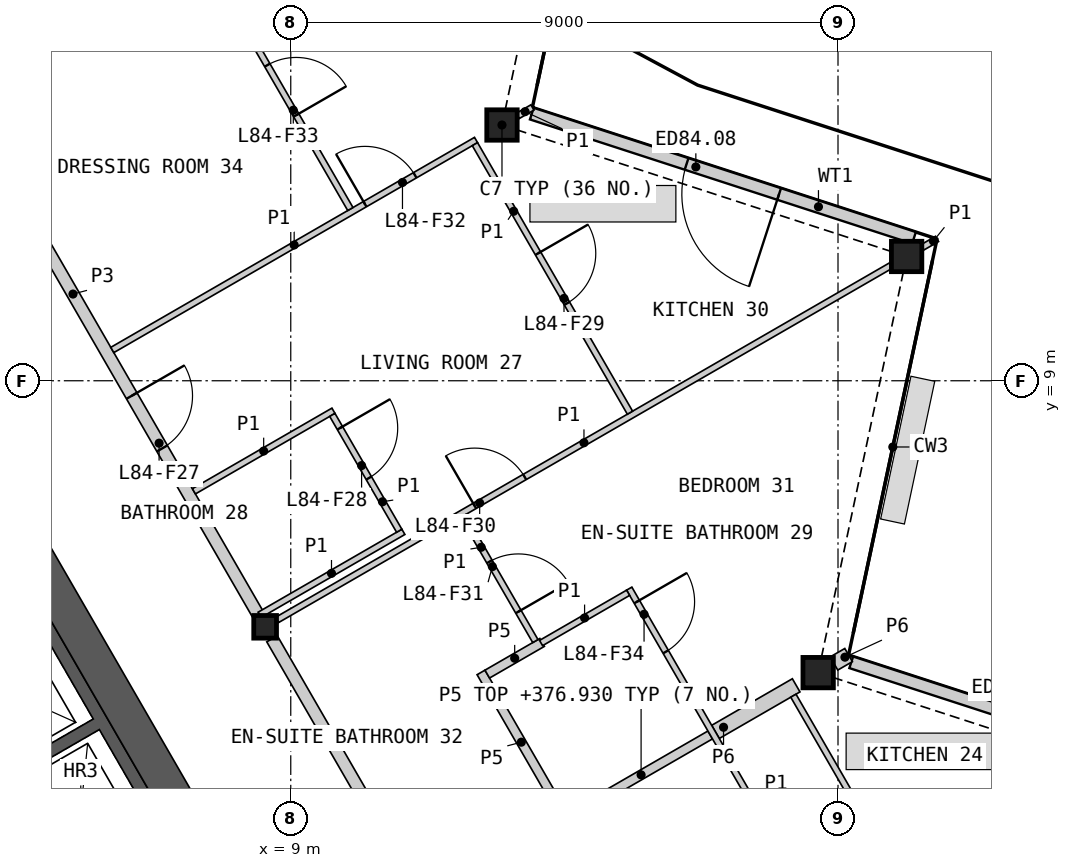
"""IFC4 building model, lengths in metres.
Left out: names, types, materials, properties, quantities, classifications, styles, units other than length and angle.
Written with IfcOpenShell. Run it as: python <this file> out.ifc"""

import sys

from ifc_helpers import new_model, si_unit, direction, frame, frame_2d, origin, origin_2d, place, context, subcontext, project, spatial, polyline, rectangle, hollow_rectangle, i_section, outline, extrude, element, fill, save


model = new_model("IFC4")
c1 = context("Model", 3, precision=1e-05, world=origin(), true_north=direction((0.0, 1.0)))
c2 = subcontext(c1, "Body", "Model", "MODEL_VIEW")
j1 = project(units=[si_unit("LENGTHUNIT", "METRE"), si_unit("PLANEANGLEUNIT", "RADIAN")], contexts=[c1])
p1 = place(None, origin())
s1 = spatial("IfcSite", under=j1, at=p1, CompositionType="ELEMENT")
p2 = place(p1, origin())
s2 = spatial("IfcBuilding", under=s1, at=p2, CompositionType="ELEMENT")
p3 = place(p2, frame((0.0, 0.0, 374.6)))
s3 = spatial("IfcBuildingStorey", under=s2, at=p3, CompositionType="ELEMENT", Elevation=374.6)
for number, where, z_axis, x_axis in (
    (1, (17.674, 4.199, 0.0), (0.0, 0.0, 1.0), (1.0, 0.0, 0.0)),
    (2, (19.129, 11.044, 0.0), (0.0, 0.0, 1.0), (1.0, 0.0, 0.0)),
    (3, (12.474, 13.206, 0.0), (0.0, 0.0, 1.0), (1.0, 0.0, 0.0)),
):
    element("IfcColumn", number, at=place(p3, frame(where, z_axis=z_axis, x_axis=x_axis)), inside=s3, PredefinedType="COLUMN", context=c2, shape_type="SweptSolid", body=[
        extrude(hollow_rectangle(XDim=0.5, YDim=0.5, WallThickness=0.03, at=origin_2d()), origin(), (0.0, 0.0, 1.0), 3.4),
    ])
p4 = place(p3, frame((8.578, 4.953, 0.0), z_axis=(0.0, 0.0, 1.0), x_axis=(1.0, 0.0, 0.0)))
e4 = element("IfcColumn", 4, at=p4, inside=s3, PredefinedType="COLUMN", context=c2, shape_type="SweptSolid", body=[
    extrude(i_section(OverallWidth=0.374, OverallDepth=0.372, WebThickness=0.016, FlangeThickness=0.026, at=origin_2d()), origin(), (0.0, 0.0, 1.0), 3.4),
])
p5 = place(p3, frame((24.45, 2.344, 0.0), z_axis=(0.0, 0.0, 1.0), x_axis=(-0.951062538214, 0.308998460199, 0.0)))
e5 = element("IfcWall", 5, at=p5, inside=s3, PredefinedType="SOLIDWALL", context=c2, shape_type="SweptSolid", body=[
    extrude(rectangle(XDim=6.553, YDim=0.2, at=frame_2d((3.277, 0.0))), origin(), (0.0, 0.0, 1.0), 2.634),
])
p6 = place(p5, frame((2.333, 0.0, 0.0)))
e6 = element("IfcOpeningElement", 6, at=p6, cuts=e5, PredefinedType="OPENING", context=c2, shape_type="SweptSolid", body=[
    extrude(rectangle(XDim=1.6, YDim=2.25, at=frame_2d((0.8, 1.125))), frame((0.0, 0.11, 0.0), z_axis=(0.0, -1.0, 0.0), x_axis=(1.0, 0.0, 0.0)), (0.0, 0.0, 1.0), 0.22),
])
p7 = place(p3, frame((19.25, 11.351, 0.0), z_axis=(0.0, 0.0, 1.0), x_axis=(-0.951060668786, 0.309004214029, 0.0)))
e7 = element("IfcWall", 7, at=p7, inside=s3, PredefinedType="SOLIDWALL", context=c2, shape_type="SweptSolid", body=[
    extrude(rectangle(XDim=6.609, YDim=0.2, at=frame_2d((3.305, 0.0))), origin(), (0.0, 0.0, 1.0), 2.634),
])
p8 = place(p7, frame((2.333, 0.0, 0.0)))
e8 = element("IfcOpeningElement", 8, at=p8, cuts=e7, PredefinedType="OPENING", context=c2, shape_type="SweptSolid", body=[
    extrude(rectangle(XDim=1.6, YDim=2.25, at=frame_2d((0.8, 1.125))), frame((0.0, 0.11, 0.0), z_axis=(0.0, -1.0, 0.0), x_axis=(1.0, 0.0, 0.0)), (0.0, 0.0, 1.0), 0.22),
])
p9 = place(p3, origin())
e9 = element("IfcWall", 9, at=p9, inside=s3, PredefinedType="SHEAR", context=c2, shape_type="SweptSolid", body=[
    extrude(outline(polyline([(1.561, 6.097), (3.731, 7.35), (8.231, -0.444), (6.061, -1.697), (5.96, -1.524), (7.952, -0.374), (6.952, 1.358), (4.96, 0.208), (4.861, 0.381), (6.852, 1.531), (5.852, 3.263), (3.861, 2.113), (3.76, 2.287), (5.752, 3.437), (4.752, 5.169), (2.76, 4.019), (2.66, 4.192), (4.652, 5.342), (3.652, 7.074), (1.66, 5.924), (1.561, 6.097)])), origin(), (0.0, 0.0, 1.0), 3.1),
])
p10 = place(p3, frame((5.817, -1.476, 0.0), z_axis=(0.0, 0.0, 1.0), x_axis=(-0.500002616675, 0.866023893041, 0.0)))
e10 = element("IfcWall", 10, at=p10, inside=s3, PredefinedType="SOLIDWALL", context=c2, shape_type="SweptSolid", body=[
    extrude(rectangle(XDim=8.373, YDim=0.2, at=frame_2d((4.187, 0.0))), origin(), (0.0, 0.0, 1.0), 3.1),
])
p11 = place(p10, frame((0.337, 0.0, 0.0)))
e11 = element("IfcOpeningElement", 11, at=p11, cuts=e10, PredefinedType="OPENING", context=c2, shape_type="SweptSolid", body=[
    extrude(rectangle(XDim=1.1, YDim=2.1, at=frame_2d((0.55, 1.05))), frame((0.0, 0.11, 0.0), z_axis=(0.0, -1.0, 0.0), x_axis=(1.0, 0.0, 0.0)), (0.0, 0.0, 1.0), 0.22),
])
p12 = place(p10, frame((2.537, 0.0, 0.0)))
e12 = element("IfcOpeningElement", 12, at=p12, cuts=e10, PredefinedType="OPENING", context=c2, shape_type="SweptSolid", body=[
    extrude(rectangle(XDim=1.1, YDim=2.1, at=frame_2d((0.55, 1.05))), frame((0.0, 0.11, 0.0), z_axis=(0.0, -1.0, 0.0), x_axis=(1.0, 0.0, 0.0)), (0.0, 0.0, 1.0), 0.22),
])
p13 = place(p10, frame((4.737, 0.0, 0.0)))
e13 = element("IfcOpeningElement", 13, at=p13, cuts=e10, PredefinedType="OPENING", context=c2, shape_type="SweptSolid", body=[
    extrude(rectangle(XDim=1.1, YDim=2.1, at=frame_2d((0.55, 1.05))), frame((0.0, 0.11, 0.0), z_axis=(0.0, -1.0, 0.0), x_axis=(1.0, 0.0, 0.0)), (0.0, 0.0, 1.0), 0.22),
])
p14 = place(p10, frame((7.037, 0.0, 0.0)))
e14 = element("IfcOpeningElement", 14, at=p14, cuts=e10, PredefinedType="OPENING", context=c2, shape_type="SweptSolid", body=[
    extrude(rectangle(XDim=0.9, YDim=2.1, at=frame_2d((0.45, 1.05))), frame((0.0, 0.11, 0.0), z_axis=(0.0, -1.0, 0.0), x_axis=(1.0, 0.0, 0.0)), (0.0, 0.0, 1.0), 0.22),
])
p15 = place(p3, frame((8.686, -0.634, 0.0), z_axis=(0.0, 0.0, 1.0), x_axis=(-0.500004601921, 0.866022746848, 0.0)))
e15 = element("IfcWall", 15, at=p15, inside=s3, PredefinedType="SHEAR", context=c2, shape_type="SweptSolid", body=[
    extrude(rectangle(XDim=16.853, YDim=0.6, at=frame_2d((8.426, 0.0))), origin(), (0.0, 0.0, 1.0), 3.1),
])
p16 = place(p3, frame((3.465, 14.01, 0.0), z_axis=(0.0, 0.0, 1.0), x_axis=(0.866032376801, 0.499987922186, 0.0)))
e16 = element("IfcWall", 16, at=p16, inside=s3, PredefinedType="PARTITIONING", context=c2, shape_type="SweptSolid", body=[
    extrude(rectangle(XDim=11.782, YDim=0.25, at=frame_2d((5.891, 0.0))), origin(), (0.0, 0.0, 1.0), 2.33),
])
p17 = place(p3, frame((4.403, 12.185, 0.0), z_axis=(0.0, 0.0, 1.0), x_axis=(0.499992155518, -0.866029932751, 0.0)))
e17 = element("IfcWall", 17, at=p17, inside=s3, PredefinedType="PARTITIONING", context=c2, shape_type="SweptSolid", body=[
    extrude(rectangle(XDim=8.123, YDim=0.2, at=frame_2d((4.062, 0.0))), origin(), (0.0, 0.0, 1.0), 3.1),
])
p18 = place(p17, frame((3.963, 0.0, 0.0)))
e18 = element("IfcOpeningElement", 18, at=p18, cuts=e17, PredefinedType="OPENING", context=c2, shape_type="SweptSolid", body=[
    extrude(rectangle(XDim=1.0, YDim=2.1, at=frame_2d((0.5, 1.05))), frame((0.0, 0.11, 0.0), z_axis=(0.0, -1.0, 0.0), x_axis=(1.0, 0.0, 0.0)), (0.0, 0.0, 1.0), 0.22),
])
p19 = place(p3, frame((8.692, 4.756, 0.0), z_axis=(0.0, 0.0, 1.0), x_axis=(0.500001682468, -0.866024432409, 0.0)))
e19 = element("IfcWall", 19, at=p19, inside=s3, PredefinedType="PARTITIONING", context=c2, shape_type="SweptSolid", body=[
    extrude(rectangle(XDim=8.124, YDim=0.2, at=frame_2d((4.062, 0.0))), origin(), (0.0, 0.0, 1.0), 3.1),
])
p20 = place(p19, frame((5.97, 0.0, 0.0)))
e20 = element("IfcOpeningElement", 20, at=p20, cuts=e19, PredefinedType="OPENING", context=c2, shape_type="SweptSolid", body=[
    extrude(rectangle(XDim=1.0, YDim=2.1, at=frame_2d((0.5, 1.05))), frame((0.0, 0.11, 0.0), z_axis=(0.0, -1.0, 0.0), x_axis=(1.0, 0.0, 0.0)), (0.0, 0.0, 1.0), 0.22),
])
p21 = place(p3, frame((15.985, 3.224, 0.0), z_axis=(0.0, 0.0, 1.0), x_axis=(0.865989259495, 0.50006259852, 0.0)))
e21 = element("IfcWall", 21, at=p21, inside=s3, PredefinedType="PARTITIONING", context=c2, shape_type="SweptSolid", body=[
    extrude(rectangle(XDim=1.532, YDim=0.25, at=frame_2d((0.766, 0.0))), origin(), (0.0, 0.0, 1.0), 2.33),
])
p22 = place(p3, frame((17.934, 4.35, 0.0), z_axis=(0.0, 0.0, 1.0), x_axis=(0.866288059981, 0.499544789918, 0.0)))
e22 = element("IfcWall", 22, at=p22, inside=s3, PredefinedType="PARTITIONING", context=c2, shape_type="SweptSolid", body=[
    extrude(rectangle(XDim=0.278, YDim=0.25, at=frame_2d((0.139, 0.0))), origin(), (0.0, 0.0, 1.0), 2.33),
])
p23 = place(p3, frame((13.625, 1.862, 0.0), z_axis=(0.0, 0.0, 1.0), x_axis=(0.866013657776, 0.500020344131, 0.0)))
e23 = element("IfcWall", 23, at=p23, inside=s3, PredefinedType="PLUMBINGWALL", context=c2, shape_type="SweptSolid", body=[
    extrude(rectangle(XDim=2.625, YDim=0.15, at=frame_2d((1.312, 0.0))), origin(), (0.0, 0.0, 1.0), 2.33),
])
p24 = place(p3, frame((12.129, 4.203, 0.0), z_axis=(0.0, 0.0, 1.0), x_axis=(0.499993606316, -0.866029095148, 0.0)))
e24 = element("IfcWall", 24, at=p24, inside=s3, PredefinedType="PLUMBINGWALL", context=c2, shape_type="SweptSolid", body=[
    extrude(rectangle(XDim=2.65, YDim=0.15, at=frame_2d((1.325, 0.0))), origin(), (0.0, 0.0, 1.0), 2.33),
])
p25 = place(p3, frame((12.232, 4.175, 0.0), z_axis=(0.0, 0.0, 1.0), x_axis=(0.866056787991, 0.499945637019, 0.0)))
e25 = element("IfcWall", 25, at=p25, inside=s3, PredefinedType="PLUMBINGWALL", context=c2, shape_type="SweptSolid", body=[
    extrude(rectangle(XDim=1.042, YDim=0.15, at=frame_2d((0.521, 0.0))), origin(), (0.0, 0.0, 1.0), 2.33),
])
p26 = place(p3, frame((8.775, 5.066, 0.0), z_axis=(0.0, 0.0, 1.0), x_axis=(0.866023724155, 0.500002909193, 0.0)))
e26 = element("IfcWall", 26, at=p26, inside=s3, PredefinedType="PARTITIONING", context=c2, shape_type="SweptSolid", body=[
    extrude(rectangle(XDim=11.655, YDim=0.1, at=frame_2d((5.827, 0.0))), origin(), (0.0, 0.0, 1.0), 2.33),
])
p27 = place(p26, frame((3.751, 0.0, 0.0)))
e27 = element("IfcOpeningElement", 27, at=p27, cuts=e26, PredefinedType="OPENING", context=c2, shape_type="SweptSolid", body=[
    extrude(rectangle(XDim=0.95, YDim=2.1, at=frame_2d((0.475, 1.05))), frame((0.0, 0.06, 0.0), z_axis=(0.0, -1.0, 0.0), x_axis=(1.0, 0.0, 0.0)), (0.0, 0.0, 1.0), 0.12),
])
p28 = place(p3, frame((6.065, 9.506, 0.0), z_axis=(0.0, 0.0, 1.0), x_axis=(0.866029020252, 0.499993736042, 0.0)))
e28 = element("IfcWall", 28, at=p28, inside=s3, PredefinedType="PARTITIONING", context=c2, shape_type="SweptSolid", body=[
    extrude(rectangle(XDim=6.907, YDim=0.1, at=frame_2d((3.454, 0.0))), origin(), (0.0, 0.0, 1.0), 2.33),
])
p29 = place(p28, frame((4.798, 0.0, 0.0)))
e29 = element("IfcOpeningElement", 29, at=p29, cuts=e28, PredefinedType="OPENING", context=c2, shape_type="SweptSolid", body=[
    extrude(rectangle(XDim=0.95, YDim=2.1, at=frame_2d((0.475, 1.05))), frame((0.0, 0.06, 0.0), z_axis=(0.0, -1.0, 0.0), x_axis=(1.0, 0.0, 0.0)), (0.0, 0.0, 1.0), 0.12),
])
p30 = place(p3, frame((14.567, 5.581, 0.0), z_axis=(0.0, 0.0, 1.0), x_axis=(0.499996545922, -0.866027397988, 0.0)))
e30 = element("IfcWall", 30, at=p30, inside=s3, PredefinedType="PARTITIONING", context=c2, shape_type="SweptSolid", body=[
    extrude(rectangle(XDim=5.5, YDim=0.1, at=frame_2d((2.75, 0.0))), origin(), (0.0, 0.0, 1.0), 2.33),
])
p31 = place(p30, frame((0.25, 0.0, 0.0)))
e31 = element("IfcOpeningElement", 31, at=p31, cuts=e30, PredefinedType="OPENING", context=c2, shape_type="SweptSolid", body=[
    extrude(rectangle(XDim=0.95, YDim=2.1, at=frame_2d((0.475, 1.05))), frame((0.0, 0.06, 0.0), z_axis=(0.0, -1.0, 0.0), x_axis=(1.0, 0.0, 0.0)), (0.0, 0.0, 1.0), 0.12),
])
p32 = place(p3, frame((7.468, 16.176, 0.0), z_axis=(0.0, 0.0, 1.0), x_axis=(0.499990214365, -0.86603105345, 0.0)))
e32 = element("IfcWall", 32, at=p32, inside=s3, PredefinedType="PARTITIONING", context=c2, shape_type="SweptSolid", body=[
    extrude(rectangle(XDim=5.025, YDim=0.1, at=frame_2d((2.512, 0.0))), origin(), (0.0, 0.0, 1.0), 2.33),
])
p33 = place(p32, frame((2.293, 0.0, 0.0)))
e33 = element("IfcOpeningElement", 33, at=p33, cuts=e32, PredefinedType="OPENING", context=c2, shape_type="SweptSolid", body=[
    extrude(rectangle(XDim=0.95, YDim=2.1, at=frame_2d((0.475, 1.05))), frame((0.0, 0.06, 0.0), z_axis=(0.0, -1.0, 0.0), x_axis=(1.0, 0.0, 0.0)), (0.0, 0.0, 1.0), 0.12),
])
p34 = place(p3, frame((12.029, 12.892, 0.0), z_axis=(0.0, 0.0, 1.0), x_axis=(0.500005610874, -0.86602216432, 0.0)))
e34 = element("IfcWall", 34, at=p34, inside=s3, PredefinedType="PARTITIONING", context=c2, shape_type="SweptSolid", body=[
    extrude(rectangle(XDim=5.1, YDim=0.1, at=frame_2d((2.55, 0.0))), origin(), (0.0, 0.0, 1.0), 2.33),
])
p35 = place(p34, frame((2.075, 0.0, 0.0)))
e35 = element("IfcOpeningElement", 35, at=p35, cuts=e34, PredefinedType="OPENING", context=c2, shape_type="SweptSolid", body=[
    extrude(rectangle(XDim=0.95, YDim=2.1, at=frame_2d((0.475, 1.05))), frame((0.0, 0.06, 0.0), z_axis=(0.0, -1.0, 0.0), x_axis=(1.0, 0.0, 0.0)), (0.0, 0.0, 1.0), 0.12),
])
p36 = place(p3, frame((17.266, 3.82, 0.0), z_axis=(0.0, 0.0, 1.0), x_axis=(0.499990214365, -0.86603105345, 0.0)))
e36 = element("IfcWall", 36, at=p36, inside=s3, PredefinedType="PARTITIONING", context=c2, shape_type="SweptSolid", body=[
    extrude(rectangle(XDim=5.025, YDim=0.1, at=frame_2d((2.512, 0.0))), origin(), (0.0, 0.0, 1.0), 2.33),
])
p37 = place(p36, frame((3.008, 0.0, 0.0)))
e37 = element("IfcOpeningElement", 37, at=p37, cuts=e36, PredefinedType="OPENING", context=c2, shape_type="SweptSolid", body=[
    extrude(rectangle(XDim=0.95, YDim=2.1, at=frame_2d((0.475, 1.05))), frame((0.0, 0.06, 0.0), z_axis=(0.0, -1.0, 0.0), x_axis=(1.0, 0.0, 0.0)), (0.0, 0.0, 1.0), 0.12),
])
p38 = place(p3, frame((7.407, 7.182, 0.0), z_axis=(0.0, 0.0, 1.0), x_axis=(0.866052124492, 0.499953715521, 0.0)))
e38 = element("IfcWall", 38, at=p38, inside=s3, PredefinedType="PARTITIONING", context=c2, shape_type="SweptSolid", body=[
    extrude(rectangle(XDim=2.65, YDim=0.1, at=frame_2d((1.325, 0.0))), origin(), (0.0, 0.0, 1.0), 2.33),
])
p39 = place(p3, frame((8.488, 5.15, 0.0), z_axis=(0.0, 0.0, 1.0), x_axis=(0.866027727466, 0.499995975244, 0.0)))
e39 = element("IfcWall", 39, at=p39, inside=s3, PredefinedType="PARTITIONING", context=c2, shape_type="SweptSolid", body=[
    extrude(rectangle(XDim=2.73, YDim=0.1, at=frame_2d((1.365, 0.0))), origin(), (0.0, 0.0, 1.0), 2.33),
])
p40 = place(p3, frame((11.835, 6.775, 0.0), z_axis=(0.0, 0.0, 1.0), x_axis=(0.500030943131, -0.866007538022, 0.0)))
e40 = element("IfcWall", 40, at=p40, inside=s3, PredefinedType="PARTITIONING", context=c2, shape_type="SweptSolid", body=[
    extrude(rectangle(XDim=2.375, YDim=0.1, at=frame_2d((1.188, 0.0))), origin(), (0.0, 0.0, 1.0), 2.33),
])
p41 = place(p40, frame((0.867, 0.0, 0.0)))
e41 = element("IfcOpeningElement", 41, at=p41, cuts=e40, PredefinedType="OPENING", context=c2, shape_type="SweptSolid", body=[
    extrude(rectangle(XDim=0.95, YDim=2.1, at=frame_2d((0.475, 1.05))), frame((0.0, 0.06, 0.0), z_axis=(0.0, -1.0, 0.0), x_axis=(1.0, 0.0, 0.0)), (0.0, 0.0, 1.0), 0.12),
])
p42 = place(p3, frame((9.684, 8.438, 0.0), z_axis=(0.0, 0.0, 1.0), x_axis=(0.499994660107, -0.866028486751, 0.0)))
e42 = element("IfcWall", 42, at=p42, inside=s3, PredefinedType="PARTITIONING", context=c2, shape_type="SweptSolid", body=[
    extrude(rectangle(XDim=2.2, YDim=0.1, at=frame_2d((1.1, 0.0))), origin(), (0.0, 0.0, 1.0), 2.33),
])
p43 = place(p42, frame((0.25, 0.0, 0.0)))
e43 = element("IfcOpeningElement", 43, at=p43, cuts=e42, PredefinedType="OPENING", context=c2, shape_type="SweptSolid", body=[
    extrude(rectangle(XDim=0.95, YDim=2.1, at=frame_2d((0.475, 1.05))), frame((0.0, 0.06, 0.0), z_axis=(0.0, -1.0, 0.0), x_axis=(1.0, 0.0, 0.0)), (0.0, 0.0, 1.0), 0.12),
])
p44 = place(p3, frame((13.116, 4.686, 0.0), z_axis=(0.0, 0.0, 1.0), x_axis=(0.866072496716, 0.499918423778, 0.0)))
e44 = element("IfcWall", 44, at=p44, inside=s3, PredefinedType="PARTITIONING", context=c2, shape_type="SweptSolid", body=[
    extrude(rectangle(XDim=1.654, YDim=0.1, at=frame_2d((0.827, 0.0))), origin(), (0.0, 0.0, 1.0), 2.33),
])
p45 = place(p3, frame((12.734, 13.356, 0.0), z_axis=(0.0, 0.0, 1.0), x_axis=(0.865687176694, 0.50058536945, 0.0)))
e45 = element("IfcWall", 45, at=p45, inside=s3, PredefinedType="PARTITIONING", context=c2, shape_type="SweptSolid", body=[
    extrude(rectangle(XDim=0.278, YDim=0.1, at=frame_2d((0.139, 0.0))), origin(), (0.0, 0.0, 1.0), 2.33),
])
p46 = place(p3, frame((19.389, 11.194, 0.0), z_axis=(0.0, 0.0, 1.0), x_axis=(0.866068339032, 0.499925626596, 0.0)))
e46 = element("IfcWall", 46, at=p46, inside=s3, PredefinedType="PARTITIONING", context=c2, shape_type="SweptSolid", body=[
    extrude(rectangle(XDim=0.277, YDim=0.1, at=frame_2d((0.139, 0.0))), origin(), (0.0, 0.0, 1.0), 2.33),
])
p47 = place(p8, origin())
e47 = element("IfcDoor", 47, at=p47, inside=s3, OperationType="DOUBLE_DOOR_SINGLE_SWING", PredefinedType="DOOR", context=c2, shape_type="SweptSolid", body=[
    extrude(rectangle(XDim=1.6, YDim=2.25, at=frame_2d((0.8, 1.125))), frame((0.0, 0.025, 0.0), z_axis=(0.0, -1.0, 0.0), x_axis=(1.0, 0.0, 0.0)), (0.0, 0.0, 1.0), 0.05),
])
fill(e8, e47)
p48 = place(p18, origin())
e48 = element("IfcDoor", 48, at=p48, inside=s3, OperationType="SINGLE_SWING_LEFT", PredefinedType="DOOR", context=c2, shape_type="SweptSolid", body=[
    extrude(rectangle(XDim=1.0, YDim=2.1, at=frame_2d((0.5, 1.05))), frame((0.0, 0.025, 0.0), z_axis=(0.0, -1.0, 0.0), x_axis=(1.0, 0.0, 0.0)), (0.0, 0.0, 1.0), 0.05),
])
fill(e18, e48)
p49 = place(p43, origin())
e49 = element("IfcDoor", 49, at=p49, inside=s3, OperationType="SINGLE_SWING_LEFT", PredefinedType="DOOR", context=c2, shape_type="SweptSolid", body=[
    extrude(rectangle(XDim=0.95, YDim=2.1, at=frame_2d((0.475, 1.05))), frame((0.0, 0.025, 0.0), z_axis=(0.0, -1.0, 0.0), x_axis=(1.0, 0.0, 0.0)), (0.0, 0.0, 1.0), 0.05),
])
fill(e43, e49)
p50 = place(p35, origin())
e50 = element("IfcDoor", 50, at=p50, inside=s3, OperationType="SINGLE_SWING_LEFT", PredefinedType="DOOR", context=c2, shape_type="SweptSolid", body=[
    extrude(rectangle(XDim=0.95, YDim=2.1, at=frame_2d((0.475, 1.05))), frame((0.0, 0.025, 0.0), z_axis=(0.0, -1.0, 0.0), x_axis=(1.0, 0.0, 0.0)), (0.0, 0.0, 1.0), 0.05),
])
fill(e35, e50)
p51 = place(p27, origin())
e51 = element("IfcDoor", 51, at=p51, inside=s3, OperationType="SINGLE_SWING_LEFT", PredefinedType="DOOR", context=c2, shape_type="SweptSolid", body=[
    extrude(rectangle(XDim=0.95, YDim=2.1, at=frame_2d((0.475, 1.05))), frame((0.0, 0.025, 0.0), z_axis=(0.0, -1.0, 0.0), x_axis=(1.0, 0.0, 0.0)), (0.0, 0.0, 1.0), 0.05),
])
fill(e27, e51)
p52 = place(p41, origin())
e52 = element("IfcDoor", 52, at=p52, inside=s3, OperationType="SINGLE_SWING_RIGHT", PredefinedType="DOOR", context=c2, shape_type="SweptSolid", body=[
    extrude(rectangle(XDim=0.95, YDim=2.1, at=frame_2d((0.475, 1.05))), frame((0.0, 0.025, 0.0), z_axis=(0.0, -1.0, 0.0), x_axis=(1.0, 0.0, 0.0)), (0.0, 0.0, 1.0), 0.05),
])
fill(e41, e52)
p53 = place(p29, origin())
e53 = element("IfcDoor", 53, at=p53, inside=s3, OperationType="SINGLE_SWING_LEFT", PredefinedType="DOOR", context=c2, shape_type="SweptSolid", body=[
    extrude(rectangle(XDim=0.95, YDim=2.1, at=frame_2d((0.475, 1.05))), frame((0.0, 0.025, 0.0), z_axis=(0.0, -1.0, 0.0), x_axis=(1.0, 0.0, 0.0)), (0.0, 0.0, 1.0), 0.05),
])
fill(e29, e53)
p54 = place(p33, origin())
e54 = element("IfcDoor", 54, at=p54, inside=s3, OperationType="SINGLE_SWING_RIGHT", PredefinedType="DOOR", context=c2, shape_type="SweptSolid", body=[
    extrude(rectangle(XDim=0.95, YDim=2.1, at=frame_2d((0.475, 1.05))), frame((0.0, 0.025, 0.0), z_axis=(0.0, -1.0, 0.0), x_axis=(1.0, 0.0, 0.0)), (0.0, 0.0, 1.0), 0.05),
])
fill(e33, e54)
p55 = place(p31, origin())
e55 = element("IfcDoor", 55, at=p55, inside=s3, OperationType="SINGLE_SWING_LEFT", PredefinedType="DOOR", context=c2, shape_type="SweptSolid", body=[
    extrude(rectangle(XDim=0.95, YDim=2.1, at=frame_2d((0.475, 1.05))), frame((0.0, 0.025, 0.0), z_axis=(0.0, -1.0, 0.0), x_axis=(1.0, 0.0, 0.0)), (0.0, 0.0, 1.0), 0.05),
])
fill(e31, e55)
save(model, sys.argv[1])
